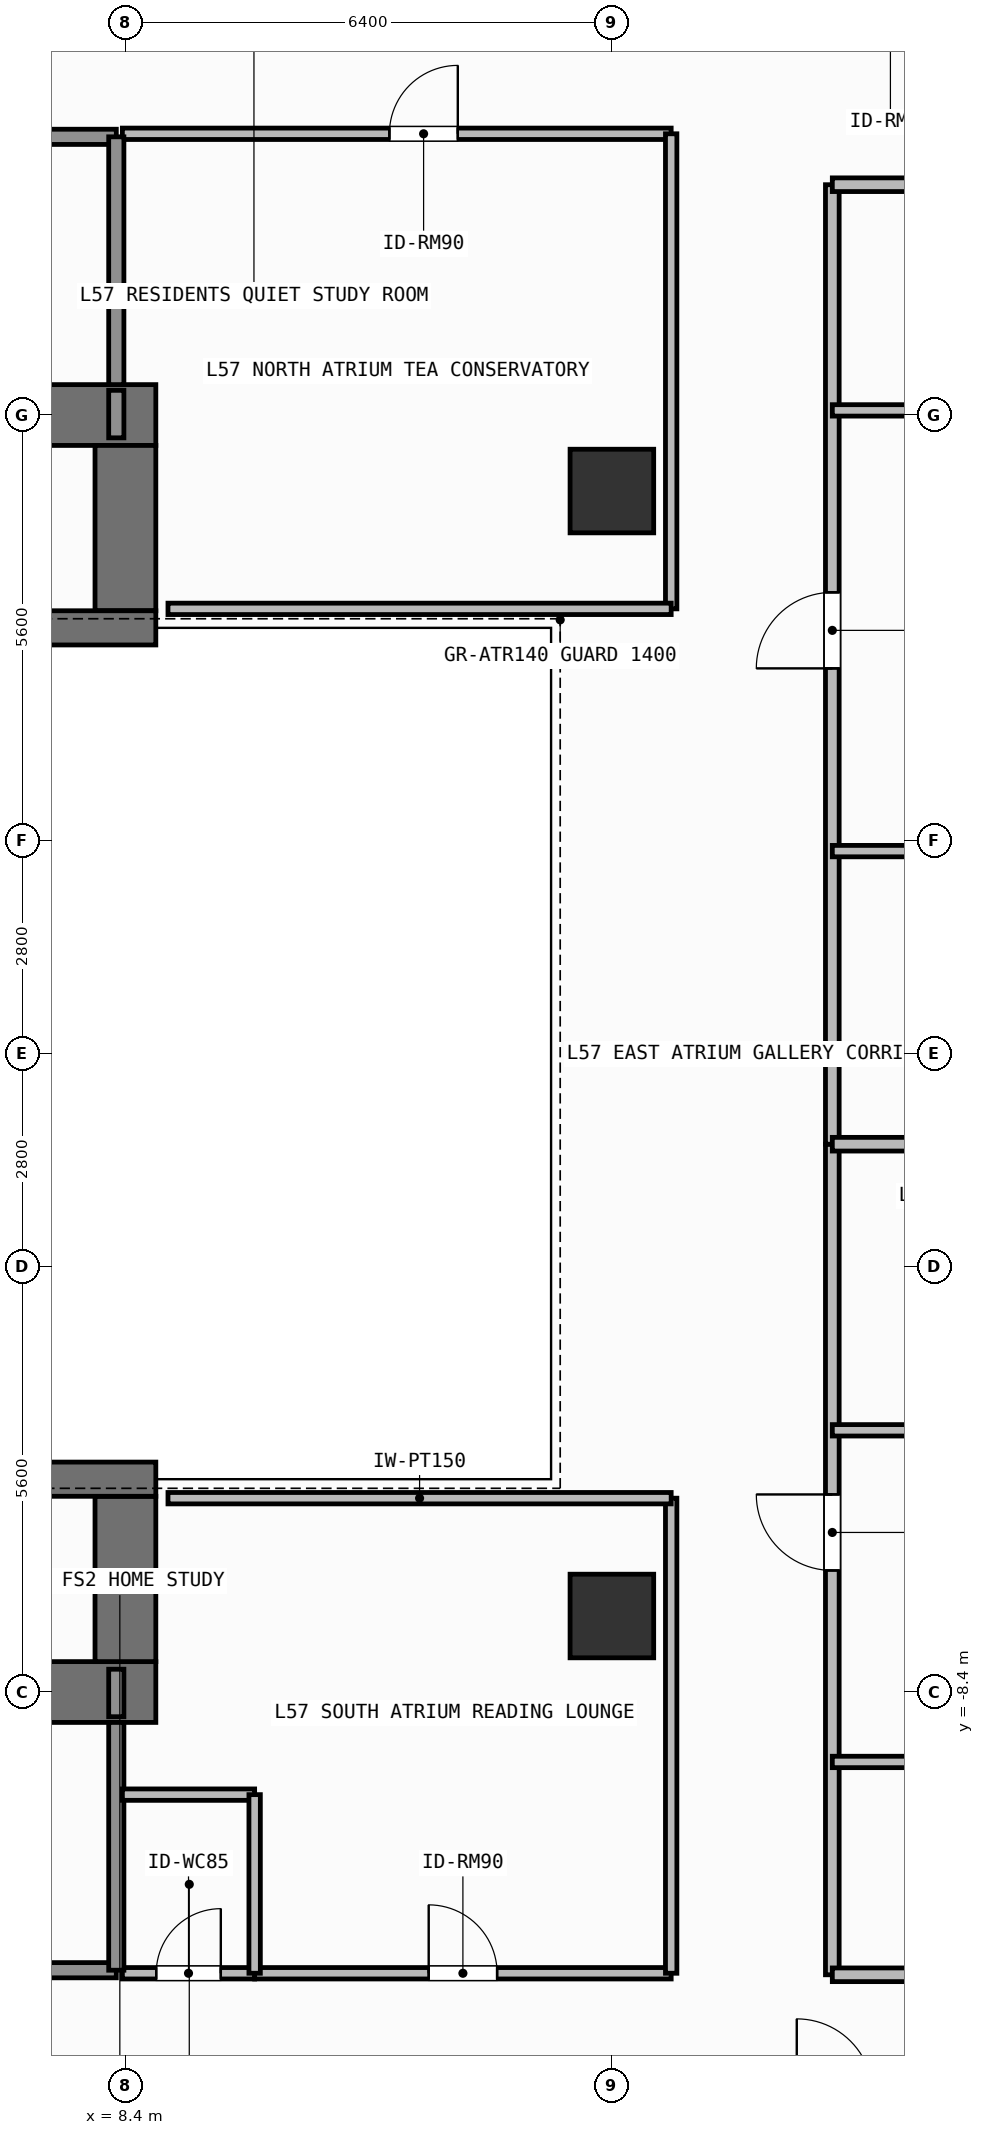
"""IFC4 building model, lengths in metres.
Left out: names, types, materials, properties, quantities, classifications, styles, units other than length and angle.
Written with IfcOpenShell. Run it as: python <this file> out.ifc"""

import sys

from ifc_helpers import new_model, si_unit, direction, frame, frame_2d, origin, origin_2d, place, context, subcontext, project, spatial, rectangle, extrude, element, fill, save


model = new_model("IFC4")
c1 = context("Model", 3, precision=1e-05, world=origin(), true_north=direction((0.0, 1.0)))
c2 = subcontext(c1, "Body", "Model", "MODEL_VIEW")
j1 = project(units=[si_unit("LENGTHUNIT", "METRE"), si_unit("PLANEANGLEUNIT", "RADIAN")], contexts=[c1])
p1 = place(None, origin())
s1 = spatial("IfcSite", under=j1, at=p1, CompositionType="ELEMENT")
p2 = place(p1, origin())
s2 = spatial("IfcBuilding", under=s1, at=p2, CompositionType="ELEMENT")
p3 = place(p2, frame((0.0, 0.0, 231.3)))
s3 = spatial("IfcBuildingStorey", under=s2, at=p3, CompositionType="ELEMENT", Elevation=231.3)
p4 = place(p3, frame((6.12, -8.4, 0.0), z_axis=(0.0, 0.0, 1.0), x_axis=(1.0, 0.0, 0.0)))
e1 = element("IfcWall", 1, at=p4, inside=s3, PredefinedType="SHEAR", context=c2, shape_type="SweptSolid", body=[
    extrude(rectangle(XDim=2.68, YDim=0.8, at=frame_2d((1.34, 0.0))), origin(), (0.0, 0.0, 1.0), 3.9),
])
p5 = place(p3, frame((-7.55, 8.4, 0.0), z_axis=(0.0, 0.0, 1.0), x_axis=(1.0, 0.0, 0.0)))
e2 = element("IfcWall", 2, at=p5, inside=s3, PredefinedType="SHEAR", context=c2, shape_type="SweptSolid", body=[
    extrude(rectangle(XDim=16.35, YDim=0.8, at=frame_2d((8.175, 0.0))), origin(), (0.0, 0.0, 1.0), 3.9),
])
for number, where, z_axis, x_axis in (
    (3, (8.4, -8.0, 0.0), (0.0, 0.0, 1.0), (0.0, 1.0, 0.0)),
    (4, (8.4, 5.825, 0.0), (0.0, 0.0, 1.0), (0.0, 1.0, 0.0)),
):
    element("IfcWall", number, at=place(p3, frame(where, z_axis=z_axis, x_axis=x_axis)), inside=s3, PredefinedType="SHEAR", context=c2, shape_type="SweptSolid", body=[
        extrude(rectangle(XDim=2.175, YDim=0.8, at=frame_2d((1.087, 0.0))), origin(), (0.0, 0.0, 1.0), 3.9),
    ])
for number, where, z_axis, x_axis in (
    (5, (3.045, -5.6, 0.0), (0.0, 0.0, 1.0), (1.0, 0.0, 0.0)),
    (6, (3.045, 5.6, 0.0), (0.0, 0.0, 1.0), (1.0, 0.0, 0.0)),
):
    element("IfcWall", number, at=place(p3, frame(where, z_axis=z_axis, x_axis=x_axis)), inside=s3, PredefinedType="SHEAR", context=c2, shape_type="SweptSolid", body=[
        extrude(rectangle(XDim=5.755, YDim=0.45, at=frame_2d((2.877, 0.0))), origin(), (0.0, 0.0, 1.0), 3.9),
    ])
for number, where, z_axis, x_axis in (
    (7, (14.8, -7.4, 0.0), (0.0, 0.0, 1.0), (1.0, 0.0, 0.0)),
    (8, (14.8, 7.4, 0.0), (0.0, 0.0, 1.0), (1.0, 0.0, 0.0)),
):
    element("IfcColumn", number, at=place(p3, frame(where, z_axis=z_axis, x_axis=x_axis)), inside=s3, PredefinedType="COLUMN", context=c2, shape_type="SweptSolid", body=[
        extrude(rectangle(XDim=1.1, YDim=1.1, at=origin_2d()), origin(), (0.0, 0.0, 1.0), 3.9),
    ])
p6 = place(p3, frame((4.58, -12.06, 0.0), z_axis=(0.0, 0.0, 1.0), x_axis=(1.0, 0.0, 0.0)))
e9 = element("IfcWall", 9, at=p6, inside=s3, PredefinedType="SOLIDWALL", context=c2, shape_type="SweptSolid", body=[
    extrude(rectangle(XDim=3.7, YDim=0.2, at=frame_2d((1.85, 0.0))), origin(), (0.0, 0.0, 1.0), 3.6),
])
p7 = place(p6, frame((1.212, 0.0, 0.0)))
e10 = element("IfcOpeningElement", 10, at=p7, cuts=e9, PredefinedType="OPENING", context=c2, shape_type="SweptSolid", body=[
    extrude(rectangle(XDim=1.1, YDim=2.15, at=frame_2d((0.55, 1.075))), frame((0.0, 0.11, 0.0), z_axis=(0.0, -1.0, 0.0), x_axis=(1.0, 0.0, 0.0)), (0.0, 0.0, 1.0), 0.22),
])
p8 = place(p3, frame((4.58, 12.06, 0.0), z_axis=(0.0, 0.0, 1.0), x_axis=(1.0, 0.0, 0.0)))
e11 = element("IfcWall", 11, at=p8, inside=s3, PredefinedType="SOLIDWALL", context=c2, shape_type="SweptSolid", body=[
    extrude(rectangle(XDim=3.7, YDim=0.2, at=frame_2d((1.85, 0.0))), origin(), (0.0, 0.0, 1.0), 3.6),
])
p9 = place(p8, frame((1.212, 0.0, 0.0)))
e12 = element("IfcOpeningElement", 12, at=p9, cuts=e11, PredefinedType="OPENING", context=c2, shape_type="SweptSolid", body=[
    extrude(rectangle(XDim=1.1, YDim=2.15, at=frame_2d((0.55, 1.075))), frame((0.0, 0.11, 0.0), z_axis=(0.0, -1.0, 0.0), x_axis=(1.0, 0.0, 0.0)), (0.0, 0.0, 1.0), 0.22),
])
p10 = place(p3, frame((8.36, -12.1, 0.0), z_axis=(0.0, 0.0, 1.0), x_axis=(1.0, 0.0, 0.0)))
e13 = element("IfcWall", 13, at=p10, inside=s3, PredefinedType="PARTITIONING", context=c2, shape_type="SweptSolid", body=[
    extrude(rectangle(XDim=1.74, YDim=0.15, at=frame_2d((0.87, 0.0))), origin(), (0.0, 0.0, 1.0), 3.6),
])
p11 = place(p10, frame((0.445, 0.0, 0.0)))
e14 = element("IfcOpeningElement", 14, at=p11, cuts=e13, PredefinedType="OPENING", context=c2, shape_type="SweptSolid", body=[
    extrude(rectangle(XDim=0.85, YDim=2.1, at=frame_2d((0.425, 1.05))), frame((0.0, 0.085, 0.0), z_axis=(0.0, -1.0, 0.0), x_axis=(1.0, 0.0, 0.0)), (0.0, 0.0, 1.0), 0.17),
])
p12 = place(p3, frame((10.1, -12.1, 0.0), z_axis=(0.0, 0.0, 1.0), x_axis=(1.0, 0.0, 0.0)))
e15 = element("IfcWall", 15, at=p12, inside=s3, PredefinedType="PARTITIONING", context=c2, shape_type="SweptSolid", body=[
    extrude(rectangle(XDim=5.48, YDim=0.15, at=frame_2d((2.74, 0.0))), origin(), (0.0, 0.0, 1.0), 3.6),
])
p13 = place(p12, frame((2.29, 0.0, 0.0)))
e16 = element("IfcOpeningElement", 16, at=p13, cuts=e15, PredefinedType="OPENING", context=c2, shape_type="SweptSolid", body=[
    extrude(rectangle(XDim=0.9, YDim=2.1, at=frame_2d((0.45, 1.05))), frame((0.0, 0.085, 0.0), z_axis=(0.0, -1.0, 0.0), x_axis=(1.0, 0.0, 0.0)), (0.0, 0.0, 1.0), 0.17),
])
p14 = place(p3, frame((8.36, 12.1, 0.0), z_axis=(0.0, 0.0, 1.0), x_axis=(1.0, 0.0, 0.0)))
e17 = element("IfcWall", 17, at=p14, inside=s3, PredefinedType="PARTITIONING", context=c2, shape_type="SweptSolid", body=[
    extrude(rectangle(XDim=7.22, YDim=0.15, at=frame_2d((3.61, 0.0))), origin(), (0.0, 0.0, 1.0), 3.6),
])
p15 = place(p14, frame((3.513, 0.0, 0.0)))
e18 = element("IfcOpeningElement", 18, at=p15, cuts=e17, PredefinedType="OPENING", context=c2, shape_type="SweptSolid", body=[
    extrude(rectangle(XDim=0.9, YDim=2.1, at=frame_2d((0.45, 1.05))), frame((0.0, 0.085, 0.0), z_axis=(0.0, -1.0, 0.0), x_axis=(1.0, 0.0, 0.0)), (0.0, 0.0, 1.0), 0.17),
])
p16 = place(p3, frame((17.7, -12.12, 0.0), z_axis=(0.0, 0.0, 1.0), x_axis=(0.0, 1.0, 0.0)))
e19 = element("IfcWall", 19, at=p16, inside=s3, PredefinedType="PARTITIONING", context=c2, shape_type="SweptSolid", body=[
    extrude(rectangle(XDim=10.927, YDim=0.18, at=frame_2d((5.463, 0.0))), origin(), (0.0, 0.0, 1.0), 3.6),
])
p17 = place(p16, frame((5.319, 0.0, 0.0)))
e20 = element("IfcOpeningElement", 20, at=p17, cuts=e19, PredefinedType="OPENING", context=c2, shape_type="SweptSolid", body=[
    extrude(rectangle(XDim=1.0, YDim=2.2, at=frame_2d((0.5, 1.1))), frame((0.0, 0.1, 0.0), z_axis=(0.0, -1.0, 0.0), x_axis=(1.0, 0.0, 0.0)), (0.0, 0.0, 1.0), 0.2),
])
p18 = place(p3, frame((17.7, -4.957, 0.0), z_axis=(0.0, 0.0, 1.0), x_axis=(1.0, 0.0, 0.0)))
e21 = element("IfcWall", 21, at=p18, inside=s3, PredefinedType="PARTITIONING", context=c2, shape_type="SweptSolid", body=[
    extrude(rectangle(XDim=4.19, YDim=0.15, at=frame_2d((2.095, 0.0))), origin(), (0.0, 0.0, 1.0), 3.6),
])
p19 = place(p18, frame((1.581, 0.0, 0.0)))
e22 = element("IfcOpeningElement", 22, at=p19, cuts=e21, PredefinedType="OPENING", context=c2, shape_type="SweptSolid", body=[
    extrude(rectangle(XDim=0.85, YDim=2.1, at=frame_2d((0.425, 1.05))), frame((0.0, 0.085, 0.0), z_axis=(0.0, -1.0, 0.0), x_axis=(1.0, 0.0, 0.0)), (0.0, 0.0, 1.0), 0.17),
])
p20 = place(p3, frame((17.7, -9.32, 0.0), z_axis=(0.0, 0.0, 1.0), x_axis=(1.0, 0.0, 0.0)))
e23 = element("IfcWall", 23, at=p20, inside=s3, PredefinedType="PARTITIONING", context=c2, shape_type="SweptSolid", body=[
    extrude(rectangle(XDim=4.19, YDim=0.15, at=frame_2d((2.095, 0.0))), origin(), (0.0, 0.0, 1.0), 3.6),
])
p21 = place(p20, frame((1.581, 0.0, 0.0)))
e24 = element("IfcOpeningElement", 24, at=p21, cuts=e23, PredefinedType="OPENING", context=c2, shape_type="SweptSolid", body=[
    extrude(rectangle(XDim=0.85, YDim=2.1, at=frame_2d((0.425, 1.05))), frame((0.0, 0.085, 0.0), z_axis=(0.0, -1.0, 0.0), x_axis=(1.0, 0.0, 0.0)), (0.0, 0.0, 1.0), 0.17),
])
p22 = place(p3, frame((17.7, -1.193, 0.0), z_axis=(0.0, 0.0, 1.0), x_axis=(0.0, 1.0, 0.0)))
e25 = element("IfcWall", 25, at=p22, inside=s3, PredefinedType="PARTITIONING", context=c2, shape_type="SweptSolid", body=[
    extrude(rectangle(XDim=12.623, YDim=0.18, at=frame_2d((6.312, 0.0))), origin(), (0.0, 0.0, 1.0), 3.6),
])
p23 = place(p22, frame((6.26, 0.0, 0.0)))
e26 = element("IfcOpeningElement", 26, at=p23, cuts=e25, PredefinedType="OPENING", context=c2, shape_type="SweptSolid", body=[
    extrude(rectangle(XDim=1.0, YDim=2.2, at=frame_2d((0.5, 1.1))), frame((0.0, 0.1, 0.0), z_axis=(0.0, -1.0, 0.0), x_axis=(1.0, 0.0, 0.0)), (0.0, 0.0, 1.0), 0.2),
])
p24 = place(p3, frame((17.7, 8.461, 0.0), z_axis=(0.0, 0.0, 1.0), x_axis=(1.0, 0.0, 0.0)))
e27 = element("IfcWall", 27, at=p24, inside=s3, PredefinedType="PARTITIONING", context=c2, shape_type="SweptSolid", body=[
    extrude(rectangle(XDim=4.693, YDim=0.15, at=frame_2d((2.347, 0.0))), origin(), (0.0, 0.0, 1.0), 3.6),
])
p25 = place(p24, frame((2.274, 0.0, 0.0)))
e28 = element("IfcOpeningElement", 28, at=p25, cuts=e27, PredefinedType="OPENING", context=c2, shape_type="SweptSolid", body=[
    extrude(rectangle(XDim=0.85, YDim=2.1, at=frame_2d((0.425, 1.05))), frame((0.0, 0.085, 0.0), z_axis=(0.0, -1.0, 0.0), x_axis=(1.0, 0.0, 0.0)), (0.0, 0.0, 1.0), 0.17),
])
p26 = place(p3, frame((17.7, 2.663, 0.0), z_axis=(0.0, 0.0, 1.0), x_axis=(1.0, 0.0, 0.0)))
e29 = element("IfcWall", 29, at=p26, inside=s3, PredefinedType="PARTITIONING", context=c2, shape_type="SweptSolid", body=[
    extrude(rectangle(XDim=4.693, YDim=0.15, at=frame_2d((2.347, 0.0))), origin(), (0.0, 0.0, 1.0), 3.6),
])
p27 = place(p26, frame((1.921, 0.0, 0.0)))
e30 = element("IfcOpeningElement", 30, at=p27, cuts=e29, PredefinedType="OPENING", context=c2, shape_type="SweptSolid", body=[
    extrude(rectangle(XDim=0.85, YDim=2.1, at=frame_2d((0.425, 1.05))), frame((0.0, 0.085, 0.0), z_axis=(0.0, -1.0, 0.0), x_axis=(1.0, 0.0, 0.0)), (0.0, 0.0, 1.0), 0.17),
])
for number, where, z_axis, x_axis in (
    (31, (8.28, -12.06, 0.0), (0.0, 0.0, 1.0), (0.0, 1.0, 0.0)),
    (32, (8.28, 8.8, 0.0), (0.0, 0.0, 1.0), (0.0, 1.0, 0.0)),
):
    element("IfcWall", number, at=place(p3, frame(where, z_axis=z_axis, x_axis=x_axis)), inside=s3, PredefinedType="SOLIDWALL", context=c2, shape_type="SweptSolid", body=[
        extrude(rectangle(XDim=3.26, YDim=0.2, at=frame_2d((1.63, 0.0))), origin(), (0.0, 0.0, 1.0), 3.6),
    ])
p28 = place(p3, frame((8.28, -8.725, 0.0), z_axis=(0.0, 0.0, 1.0), x_axis=(0.0, 1.0, 0.0)))
e33 = element("IfcWall", 33, at=p28, inside=s3, PredefinedType="SOLIDWALL", context=c2, shape_type="SweptSolid", body=[
    extrude(rectangle(XDim=0.625, YDim=0.2, at=frame_2d((0.312, 0.0))), origin(), (0.0, 0.0, 1.0), 3.6),
])
p29 = place(p3, frame((8.36, -9.75, 0.0), z_axis=(0.0, 0.0, 1.0), x_axis=(1.0, 0.0, 0.0)))
e34 = element("IfcWall", 34, at=p29, inside=s3, PredefinedType="PARTITIONING", context=c2, shape_type="SweptSolid", body=[
    extrude(rectangle(XDim=1.74, YDim=0.15, at=frame_2d((0.87, 0.0))), origin(), (0.0, 0.0, 1.0), 3.6),
])
p30 = place(p3, frame((10.1, -12.1, 0.0), z_axis=(0.0, 0.0, 1.0), x_axis=(0.0, 1.0, 0.0)))
e35 = element("IfcWall", 35, at=p30, inside=s3, PredefinedType="PARTITIONING", context=c2, shape_type="SweptSolid", body=[
    extrude(rectangle(XDim=2.35, YDim=0.15, at=frame_2d((1.175, 0.0))), origin(), (0.0, 0.0, 1.0), 3.6),
])
p31 = place(p3, frame((15.58, -12.1, 0.0), z_axis=(0.0, 0.0, 1.0), x_axis=(0.0, 1.0, 0.0)))
e36 = element("IfcWall", 36, at=p31, inside=s3, PredefinedType="PARTITIONING", context=c2, shape_type="SweptSolid", body=[
    extrude(rectangle(XDim=6.25, YDim=0.15, at=frame_2d((3.125, 0.0))), origin(), (0.0, 0.0, 1.0), 3.6),
])
p32 = place(p3, frame((8.96, -5.85, 0.0), z_axis=(0.0, 0.0, 1.0), x_axis=(1.0, 0.0, 0.0)))
e37 = element("IfcWall", 37, at=p32, inside=s3, PredefinedType="PARTITIONING", context=c2, shape_type="SweptSolid", body=[
    extrude(rectangle(XDim=6.62, YDim=0.15, at=frame_2d((3.31, 0.0))), origin(), (0.0, 0.0, 1.0), 3.6),
])
p33 = place(p3, frame((8.28, 8.1, 0.0), z_axis=(0.0, 0.0, 1.0), x_axis=(0.0, 1.0, 0.0)))
e38 = element("IfcWall", 38, at=p33, inside=s3, PredefinedType="SOLIDWALL", context=c2, shape_type="SweptSolid", body=[
    extrude(rectangle(XDim=0.625, YDim=0.2, at=frame_2d((0.312, 0.0))), origin(), (0.0, 0.0, 1.0), 3.6),
])
p34 = place(p3, frame((15.58, 5.85, 0.0), z_axis=(0.0, 0.0, 1.0), x_axis=(0.0, 1.0, 0.0)))
e39 = element("IfcWall", 39, at=p34, inside=s3, PredefinedType="PARTITIONING", context=c2, shape_type="SweptSolid", body=[
    extrude(rectangle(XDim=6.25, YDim=0.15, at=frame_2d((3.125, 0.0))), origin(), (0.0, 0.0, 1.0), 3.6),
])
p35 = place(p3, frame((8.96, 5.85, 0.0), z_axis=(0.0, 0.0, 1.0), x_axis=(1.0, 0.0, 0.0)))
e40 = element("IfcWall", 40, at=p35, inside=s3, PredefinedType="PARTITIONING", context=c2, shape_type="SweptSolid", body=[
    extrude(rectangle(XDim=6.62, YDim=0.15, at=frame_2d((3.31, 0.0))), origin(), (0.0, 0.0, 1.0), 3.6),
])
for number, where, z_axis, x_axis in (
    (41, (17.7, -1.193, 0.0), (0.0, 0.0, 1.0), (1.0, 0.0, 0.0)),
    (42, (17.7, -12.12, 0.0), (0.0, 0.0, 1.0), (1.0, 0.0, 0.0)),
):
    element("IfcWall", number, at=place(p3, frame(where, z_axis=z_axis, x_axis=x_axis)), inside=s3, PredefinedType="PARTITIONING", context=c2, shape_type="SweptSolid", body=[
        extrude(rectangle(XDim=8.43, YDim=0.18, at=frame_2d((4.215, 0.0))), origin(), (0.0, 0.0, 1.0), 3.6),
    ])
p36 = place(p3, frame((17.7, 11.43, 0.0), z_axis=(0.0, 0.0, 1.0), x_axis=(1.0, 0.0, 0.0)))
e43 = element("IfcWall", 43, at=p36, inside=s3, PredefinedType="PARTITIONING", context=c2, shape_type="SweptSolid", body=[
    extrude(rectangle(XDim=8.43, YDim=0.18, at=frame_2d((4.215, 0.0))), origin(), (0.0, 0.0, 1.0), 3.34),
])
p37 = place(p11, origin())
e44 = element("IfcDoor", 44, at=p37, inside=s3, OperationType="SINGLE_SWING_RIGHT", PredefinedType="DOOR", context=c2, shape_type="SweptSolid", body=[
    extrude(rectangle(XDim=0.85, YDim=2.1, at=frame_2d((0.425, 1.05))), frame((0.0, 0.025, 0.0), z_axis=(0.0, -1.0, 0.0), x_axis=(1.0, 0.0, 0.0)), (0.0, 0.0, 1.0), 0.05),
])
fill(e14, e44)
p38 = place(p13, origin())
e45 = element("IfcDoor", 45, at=p38, inside=s3, OperationType="SINGLE_SWING_LEFT", PredefinedType="DOOR", context=c2, shape_type="SweptSolid", body=[
    extrude(rectangle(XDim=0.9, YDim=2.1, at=frame_2d((0.45, 1.05))), frame((0.0, 0.025, 0.0), z_axis=(0.0, -1.0, 0.0), x_axis=(1.0, 0.0, 0.0)), (0.0, 0.0, 1.0), 0.05),
])
fill(e16, e45)
p39 = place(p15, origin())
e46 = element("IfcDoor", 46, at=p39, inside=s3, OperationType="SINGLE_SWING_RIGHT", PredefinedType="DOOR", context=c2, shape_type="SweptSolid", body=[
    extrude(rectangle(XDim=0.9, YDim=2.1, at=frame_2d((0.45, 1.05))), frame((0.0, 0.025, 0.0), z_axis=(0.0, -1.0, 0.0), x_axis=(1.0, 0.0, 0.0)), (0.0, 0.0, 1.0), 0.05),
])
fill(e18, e46)
p40 = place(p17, origin())
e47 = element("IfcDoor", 47, at=p40, inside=s3, OperationType="SINGLE_SWING_RIGHT", PredefinedType="DOOR", context=c2, shape_type="SweptSolid", body=[
    extrude(rectangle(XDim=1.0, YDim=2.2, at=frame_2d((0.5, 1.1))), frame((0.0, 0.025, 0.0), z_axis=(0.0, -1.0, 0.0), x_axis=(1.0, 0.0, 0.0)), (0.0, 0.0, 1.0), 0.05),
])
fill(e20, e47)
p41 = place(p23, origin())
e48 = element("IfcDoor", 48, at=p41, inside=s3, OperationType="SINGLE_SWING_LEFT", PredefinedType="DOOR", context=c2, shape_type="SweptSolid", body=[
    extrude(rectangle(XDim=1.0, YDim=2.2, at=frame_2d((0.5, 1.1))), frame((0.0, 0.025, 0.0), z_axis=(0.0, -1.0, 0.0), x_axis=(1.0, 0.0, 0.0)), (0.0, 0.0, 1.0), 0.05),
])
fill(e26, e48)
save(model, sys.argv[1])
